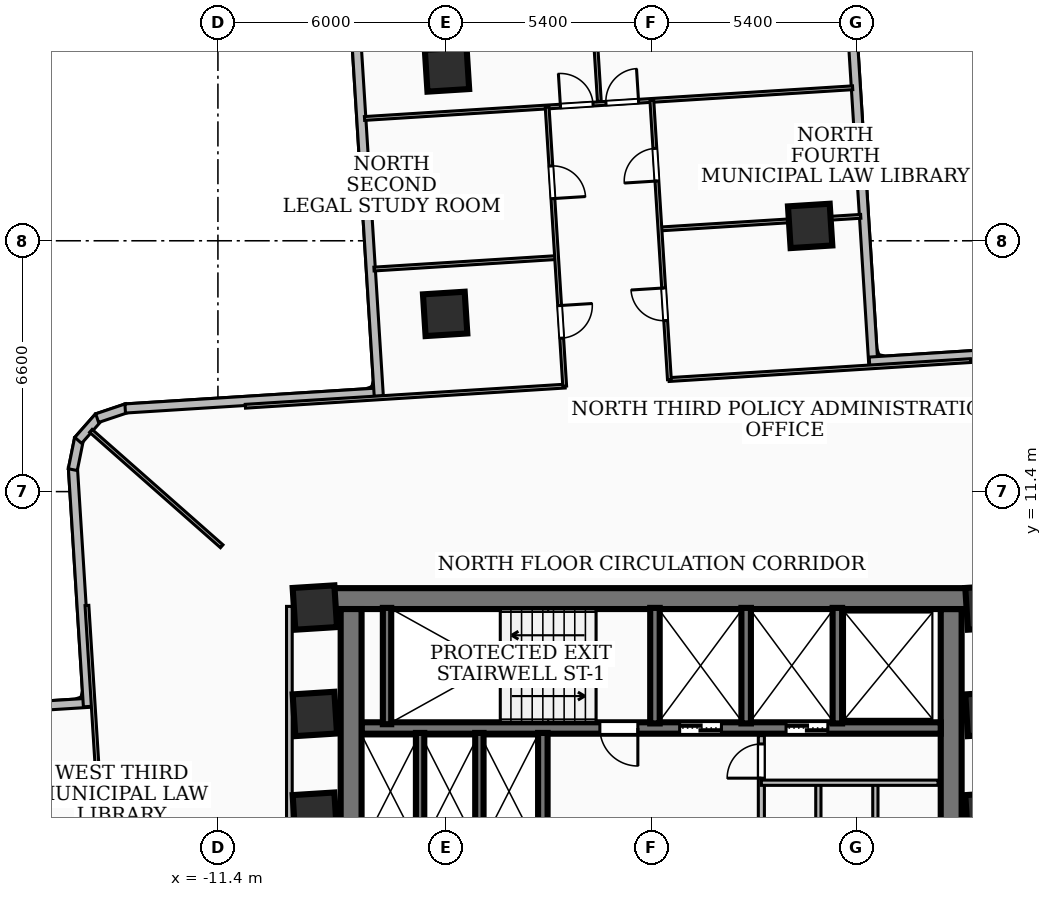
"""IFC4 building model, lengths in metres.
Left out: names, types, materials, properties, quantities, classifications, styles, units other than length and angle.
Written with IfcOpenShell. Run it as: python <this file> out.ifc"""

import sys

from ifc_helpers import new_model, si_unit, direction, frame, frame_2d, origin, origin_2d, place, context, subcontext, project, spatial, rectangle, extrude, element, fill, save


model = new_model("IFC4")
c1 = context("Model", 3, precision=1e-05, world=origin(), true_north=direction((0.0, 1.0)))
c2 = subcontext(c1, "Body", "Model", "MODEL_VIEW")
j1 = project(units=[si_unit("LENGTHUNIT", "METRE"), si_unit("PLANEANGLEUNIT", "RADIAN")], contexts=[c1])
p1 = place(None, origin())
s1 = spatial("IfcSite", under=j1, at=p1, CompositionType="ELEMENT")
p2 = place(p1, origin())
s2 = spatial("IfcBuilding", under=s1, at=p2, CompositionType="ELEMENT")
p3 = place(p2, frame((0.0, 0.0, 49.68)))
s3 = spatial("IfcBuildingStorey", under=s2, at=p3, CompositionType="ELEMENT", Elevation=49.68)
p4 = place(p3, frame((-8.78, 8.585, 0.0), z_axis=(0.0, 0.0, 1.0), x_axis=(1.0, 0.0, 0.0)))
e1 = element("IfcWall", 1, at=p4, inside=s3, PredefinedType="SHEAR", context=c2, shape_type="SweptSolid", body=[
    extrude(rectangle(XDim=17.56, YDim=0.55, at=frame_2d((8.78, 0.0))), origin(), (0.0, 0.0, 1.0), 3.32),
])
for number, where, z_axis, x_axis in (
    (2, (-7.895, 2.025, 0.0), (0.0, 0.0, 1.0), (0.0, 1.0, 0.0)),
    (3, (7.895, 8.31, 0.0), (0.0, 0.0, 1.0), (0.0, -1.0, 0.0)),
):
    element("IfcWall", number, at=place(p3, frame(where, z_axis=z_axis, x_axis=x_axis)), inside=s3, PredefinedType="SHEAR", context=c2, shape_type="SweptSolid", body=[
        extrude(rectangle(XDim=6.285, YDim=0.55, at=frame_2d((3.143, 0.0))), origin(), (0.0, 0.0, 1.0), 3.32),
    ])
p5 = place(p3, frame((7.62, 5.18, 0.0), z_axis=(0.0, 0.0, 1.0), x_axis=(-1.0, 0.0, 0.0)))
e4 = element("IfcWall", 4, at=p5, inside=s3, PredefinedType="SOLIDWALL", context=c2, shape_type="SweptSolid", body=[
    extrude(rectangle(XDim=15.24, YDim=0.3, at=frame_2d((7.62, 0.0))), origin(), (0.0, 0.0, 1.0), 3.32),
])
p6 = place(p5, frame((5.77, 0.0, 0.0)))
e5 = element("IfcOpeningElement", 5, at=p6, cuts=e4, PredefinedType="OPENING", context=c2, shape_type="SweptSolid", body=[
    extrude(rectangle(XDim=1.1, YDim=2.15, at=frame_2d((0.55, 1.075))), frame((0.0, 0.16, 0.0), z_axis=(0.0, -1.0, 0.0), x_axis=(1.0, 0.0, 0.0)), (0.0, 0.0, 1.0), 0.32),
])
p7 = place(p5, frame((2.97, 0.0, 0.0)))
e6 = element("IfcOpeningElement", 6, at=p7, cuts=e4, PredefinedType="OPENING", context=c2, shape_type="SweptSolid", body=[
    extrude(rectangle(XDim=1.1, YDim=2.15, at=frame_2d((0.55, 1.075))), frame((0.0, 0.16, 0.0), z_axis=(0.0, -1.0, 0.0), x_axis=(1.0, 0.0, 0.0)), (0.0, 0.0, 1.0), 0.32),
])
p8 = place(p5, frame((7.97, 0.0, 0.0)))
e7 = element("IfcOpeningElement", 7, at=p8, cuts=e4, PredefinedType="OPENING", context=c2, shape_type="SweptSolid", body=[
    extrude(rectangle(XDim=1.0, YDim=2.1, at=frame_2d((0.5, 1.05))), frame((0.0, 0.16, 0.0), z_axis=(0.0, -1.0, 0.0), x_axis=(1.0, 0.0, 0.0)), (0.0, 0.0, 1.0), 0.32),
])
p9 = place(p3, frame((-6.95, 5.28, 0.0), z_axis=(0.0, 0.0, 1.0), x_axis=(0.0, 1.0, 0.0)))
e8 = element("IfcWall", 8, at=p9, inside=s3, PredefinedType="SOLIDWALL", context=c2, shape_type="SweptSolid", body=[
    extrude(rectangle(XDim=3.06, YDim=0.22, at=frame_2d((1.53, 0.0))), origin(), (0.0, 0.0, 1.0), 3.32),
])
for number, where, z_axis, x_axis in (
    (9, (0.1, 5.3, 0.0), (0.0, 0.0, 1.0), (0.0, 1.0, 0.0)),
    (10, (2.5, 5.3, 0.0), (0.0, 0.0, 1.0), (0.0, 1.0, 0.0)),
    (11, (4.9, 5.3, 0.0), (0.0, 0.0, 1.0), (0.0, 1.0, 0.0)),
):
    element("IfcWall", number, at=place(p3, frame(where, z_axis=z_axis, x_axis=x_axis)), inside=s3, PredefinedType="SOLIDWALL", context=c2, shape_type="SweptSolid", body=[
        extrude(rectangle(XDim=3.04, YDim=0.25, at=frame_2d((1.52, 0.0))), origin(), (0.0, 0.0, 1.0), 3.32),
    ])
p10 = place(p3, frame((-2.85, 1.98, 0.0), z_axis=(0.0, 0.0, 1.0), x_axis=(0.0, 1.0, 0.0)))
e12 = element("IfcWall", 12, at=p10, inside=s3, PredefinedType="SOLIDWALL", context=c2, shape_type="SweptSolid", body=[
    extrude(rectangle(XDim=3.07, YDim=0.25, at=frame_2d((1.535, 0.0))), origin(), (0.0, 0.0, 1.0), 3.32),
])
for number, where, z_axis, x_axis in (
    (13, (-6.08, 1.98, 0.0), (0.0, 0.0, 1.0), (0.0, 1.0, 0.0)),
    (14, (-4.52, 1.98, 0.0), (0.0, 0.0, 1.0), (0.0, 1.0, 0.0)),
):
    element("IfcWall", number, at=place(p3, frame(where, z_axis=z_axis, x_axis=x_axis)), inside=s3, PredefinedType="SOLIDWALL", context=c2, shape_type="SweptSolid", body=[
        extrude(rectangle(XDim=3.07, YDim=0.22, at=frame_2d((1.535, 0.0))), origin(), (0.0, 0.0, 1.0), 3.32),
    ])
for number, where, z_axis, x_axis in (
    (15, (-8.85, 2.9, 0.0), (0.0, 0.0, 1.0), (0.998, 0.063, 0.0)),
    (16, (-8.85, 5.55, 0.0), (0.0, 0.0, 1.0), (0.998, 0.063, 0.0)),
    (17, (8.85, 2.9, 0.0), (0.0, 0.0, 1.0), (0.998, 0.063, 0.0)),
    (18, (8.85, 5.55, 0.0), (0.0, 0.0, 1.0), (0.998, 0.063, 0.0)),
    (19, (-8.85, 8.35, 0.0), (0.0, 0.0, 1.0), (0.998, 0.063, 0.0)),
    (20, (8.85, 8.35, 0.0), (0.0, 0.0, 1.0), (0.998, 0.063, 0.0)),
    (21, (4.184, 18.391, 0.0), (0.0, 0.0, 1.0), (0.998, 0.063, 0.0)),
    (22, (-5.421, 16.076, 0.0), (0.0, 0.0, 1.0), (0.998, 0.063, 0.0)),
    (23, (-5.372, 22.507, 0.0), (0.0, 0.0, 1.0), (0.998, 0.063, 0.0)),
):
    element("IfcColumn", number, at=place(p3, frame(where, z_axis=z_axis, x_axis=x_axis)), inside=s3, PredefinedType="COLUMN", context=c2, shape_type="SweptSolid", body=[
        extrude(rectangle(XDim=1.1, YDim=1.1, at=origin_2d()), origin(), (0.0, 0.0, 1.0), 3.6),
    ])
p11 = place(p3, frame((-31.572, 4.787, 0.0), z_axis=(0.0, 0.0, 1.0), x_axis=(0.998025974342, 0.062802504235, 0.0)))
e24 = element("IfcWall", 24, at=p11, inside=s3, PredefinedType="SOLIDWALL", context=c2, shape_type="SweptSolid", body=[
    extrude(rectangle(XDim=16.875, YDim=0.24, at=frame_2d((8.438, 0.0))), origin(), (0.0, 0.0, 1.0), 3.32),
])
p12 = place(p11, frame((1.1, 0.0, 0.85)))
e25 = element("IfcOpeningElement", 25, at=p12, cuts=e24, PredefinedType="OPENING", context=c2, shape_type="SweptSolid", body=[
    extrude(rectangle(XDim=1.8, YDim=1.8, at=frame_2d((0.9, 0.9))), frame((0.0, 0.13, 0.0), z_axis=(0.0, -1.0, 0.0), x_axis=(1.0, 0.0, 0.0)), (0.0, 0.0, 1.0), 0.26),
])
p13 = place(p3, frame((-14.82, 5.745, 0.0), z_axis=(0.0, 0.0, 1.0), x_axis=(-0.062902193405, 0.998019696231, 0.0)))
e26 = element("IfcWall", 26, at=p13, inside=s3, PredefinedType="SOLIDWALL", context=c2, shape_type="SweptSolid", body=[
    extrude(rectangle(XDim=6.295, YDim=0.24, at=frame_2d((3.148, 0.0))), origin(), (0.0, 0.0, 1.0), 3.32),
])
p14 = place(p3, frame((-15.219, 11.978, 0.0), z_axis=(0.0, 0.0, 1.0), x_axis=(0.198715846348, 0.980057147523, 0.0)))
e27 = element("IfcWall", 27, at=p14, inside=s3, PredefinedType="SOLIDWALL", context=c2, shape_type="SweptSolid", body=[
    extrude(rectangle(XDim=0.831, YDim=0.24, at=frame_2d((0.415, 0.0))), origin(), (0.0, 0.0, 1.0), 3.32),
])
p15 = place(p3, frame((-15.076, 12.748, 0.0), z_axis=(0.0, 0.0, 1.0), x_axis=(0.66076961759, 0.750588777208, 0.0)))
e28 = element("IfcWall", 28, at=p15, inside=s3, PredefinedType="SOLIDWALL", context=c2, shape_type="SweptSolid", body=[
    extrude(rectangle(XDim=0.815, YDim=0.24, at=frame_2d((0.408, 0.0))), origin(), (0.0, 0.0, 1.0), 3.32),
])
p16 = place(p3, frame((-14.578, 13.333, 0.0), z_axis=(0.0, 0.0, 1.0), x_axis=(0.948093326492, 0.317992207862, 0.0)))
e29 = element("IfcWall", 29, at=p16, inside=s3, PredefinedType="SOLIDWALL", context=c2, shape_type="SweptSolid", body=[
    extrude(rectangle(XDim=0.83, YDim=0.24, at=frame_2d((0.415, 0.0))), origin(), (0.0, 0.0, 1.0), 3.32),
])
p17 = place(p3, frame((-13.84, 13.587, 0.0), z_axis=(0.0, 0.0, 1.0), x_axis=(0.998021898782, 0.062867237505, 0.0)))
e30 = element("IfcWall", 30, at=p17, inside=s3, PredefinedType="SOLIDWALL", context=c2, shape_type="SweptSolid", body=[
    extrude(rectangle(XDim=6.777, YDim=0.24, at=frame_2d((3.388, 0.0))), origin(), (0.0, 0.0, 1.0), 3.32),
])
p18 = place(p3, frame((-7.167, 13.911, 0.0), z_axis=(0.0, 0.0, 1.0), x_axis=(-0.062847485521, 0.9980231428, 0.0)))
e31 = element("IfcWall", 31, at=p18, inside=s3, PredefinedType="SOLIDWALL", context=c2, shape_type="SweptSolid", body=[
    extrude(rectangle(XDim=13.476, YDim=0.24, at=frame_2d((6.738, 0.0))), origin(), (0.0, 0.0, 1.0), 3.32),
])
p19 = place(p18, frame((10.576, 0.0, 0.85)))
e32 = element("IfcOpeningElement", 32, at=p19, cuts=e31, PredefinedType="OPENING", context=c2, shape_type="SweptSolid", body=[
    extrude(rectangle(XDim=1.8, YDim=2.0, at=frame_2d((0.9, 1.0))), frame((0.0, 0.13, 0.0), z_axis=(0.0, -1.0, 0.0), x_axis=(1.0, 0.0, 0.0)), (0.0, 0.0, 1.0), 0.26),
])
p20 = place(p3, frame((5.0, 28.179, 0.0), z_axis=(0.0, 0.0, 1.0), x_axis=(0.062848621891, -0.99802307124, 0.0)))
e33 = element("IfcWall", 33, at=p20, inside=s3, PredefinedType="SOLIDWALL", context=c2, shape_type="SweptSolid", body=[
    extrude(rectangle(XDim=13.476, YDim=0.24, at=frame_2d((6.738, 0.0))), origin(), (0.0, 0.0, 1.0), 2.401),
])
p21 = place(p3, frame((5.745, 14.82, 0.0), z_axis=(0.0, 0.0, 1.0), x_axis=(0.998019696231, 0.062902193405, 0.0)))
e34 = element("IfcWall", 34, at=p21, inside=s3, PredefinedType="SOLIDWALL", context=c2, shape_type="SweptSolid", body=[
    extrude(rectangle(XDim=6.295, YDim=0.24, at=frame_2d((3.148, 0.0))), origin(), (0.0, 0.0, 1.0), 2.401),
])
p22 = place(p3, frame((2.9, 2.04, 0.0), z_axis=(0.0, 0.0, 1.0), x_axis=(0.0, 1.0, 0.0)))
e35 = element("IfcWall", 35, at=p22, inside=s3, PredefinedType="PARTITIONING", context=c2, shape_type="SweptSolid", body=[
    extrude(rectangle(XDim=2.94, YDim=0.16, at=frame_2d((1.47, 0.0))), origin(), (0.0, 0.0, 1.0), 2.385),
])
p23 = place(p22, frame((1.82, 0.0, 0.0)))
e36 = element("IfcOpeningElement", 36, at=p23, cuts=e35, PredefinedType="OPENING", context=c2, shape_type="SweptSolid", body=[
    extrude(rectangle(XDim=0.9, YDim=2.06, at=frame_2d((0.45, 1.03))), frame((0.0, 0.09, 0.0), z_axis=(0.0, -1.0, 0.0), x_axis=(1.0, 0.0, 0.0)), (0.0, 0.0, 1.0), 0.18),
])
p24 = place(p3, frame((2.9, 3.74, 0.0), z_axis=(0.0, 0.0, 1.0), x_axis=(1.0, 0.0, 0.0)))
e37 = element("IfcWall", 37, at=p24, inside=s3, PredefinedType="PARTITIONING", context=c2, shape_type="SweptSolid", body=[
    extrude(rectangle(XDim=4.65, YDim=0.138, at=frame_2d((2.325, 0.0))), origin(), (0.0, 0.0, 1.0), 3.32),
])
for number, where, z_axis, x_axis in (
    (38, (4.4, 1.85, 0.0), (0.0, 0.0, 1.0), (0.0, 1.0, 0.0)),
    (39, (5.9, 1.85, 0.0), (0.0, 0.0, 1.0), (0.0, 1.0, 0.0)),
):
    element("IfcWall", number, at=place(p3, frame(where, z_axis=z_axis, x_axis=x_axis)), inside=s3, PredefinedType="PARTITIONING", context=c2, shape_type="SweptSolid", body=[
        extrude(rectangle(XDim=1.89, YDim=0.138, at=frame_2d((0.945, 0.0))), origin(), (0.0, 0.0, 1.0), 2.385),
    ])
p25 = place(p3, frame((-9.52, 1.75, 0.0), z_axis=(0.0, 0.0, 1.0), x_axis=(0.0, 1.0, 0.0)))
e40 = element("IfcWall", 40, at=p25, inside=s3, PredefinedType="PARTITIONING", context=c2, shape_type="SweptSolid", body=[
    extrude(rectangle(XDim=6.63, YDim=0.15, at=frame_2d((3.315, 0.0))), origin(), (0.0, 0.0, 1.0), 2.401),
])
p26 = place(p3, frame((-11.3, 9.962, 0.0), z_axis=(0.0, 0.0, 1.0), x_axis=(-0.750020974917, 0.661414043686, 0.0)))
e41 = element("IfcWall", 41, at=p26, inside=s3, PredefinedType="PARTITIONING", context=c2, shape_type="SweptSolid", body=[
    extrude(rectangle(XDim=4.59, YDim=0.1, at=frame_2d((2.295, 0.0))), origin(), (0.0, 0.0, 1.0), 3.32),
])
p27 = place(p3, frame((-2.265, 14.176, 0.0), z_axis=(0.0, 0.0, 1.0), x_axis=(-0.998021351542, -0.062875924382, 0.0)))
e42 = element("IfcWall", 42, at=p27, inside=s3, PredefinedType="PARTITIONING", context=c2, shape_type="SweptSolid", body=[
    extrude(rectangle(XDim=8.43, YDim=0.1, at=frame_2d((4.215, 0.0))), origin(), (0.0, 0.0, 1.0), 2.401),
])
p28 = place(p3, frame((8.404, 14.847, 0.0), z_axis=(0.0, 0.0, 1.0), x_axis=(-0.998027884619, -0.062772139706, 0.0)))
e43 = element("IfcWall", 43, at=p28, inside=s3, PredefinedType="PARTITIONING", context=c2, shape_type="SweptSolid", body=[
    extrude(rectangle(XDim=7.95, YDim=0.1, at=frame_2d((3.975, 0.0))), origin(), (0.0, 0.0, 1.0), 2.401),
])
p29 = place(p3, frame((-2.507, 17.557, 0.0), z_axis=(0.0, 0.0, 1.0), x_axis=(-0.998030925593, -0.062723771889, 0.0)))
e44 = element("IfcWall", 44, at=p29, inside=s3, PredefinedType="PARTITIONING", context=c2, shape_type="SweptSolid", body=[
    extrude(rectangle(XDim=4.795, YDim=0.1, at=frame_2d((2.398, 0.0))), origin(), (0.0, 0.0, 1.0), 2.401),
])
p30 = place(p3, frame((5.515, 18.643, 0.0), z_axis=(0.0, 0.0, 1.0), x_axis=(-0.998028187643, -0.062767321666, 0.0)))
e45 = element("IfcWall", 45, at=p30, inside=s3, PredefinedType="PARTITIONING", context=c2, shape_type="SweptSolid", body=[
    extrude(rectangle(XDim=5.274, YDim=0.1, at=frame_2d((2.637, 0.0))), origin(), (0.0, 0.0, 1.0), 2.401),
])
p31 = place(p3, frame((-2.737, 21.521, 0.0), z_axis=(0.0, 0.0, 1.0), x_axis=(0.062789217057, -0.998026810372, 0.0)))
e46 = element("IfcWall", 46, at=p31, inside=s3, PredefinedType="PARTITIONING", context=c2, shape_type="SweptSolid", body=[
    extrude(rectangle(XDim=7.36, YDim=0.1, at=frame_2d((3.68, 0.0))), origin(), (0.0, 0.0, 1.0), 3.32),
])
p32 = place(p31, frame((5.236, 0.0, 0.0)))
e47 = element("IfcOpeningElement", 47, at=p32, cuts=e46, PredefinedType="OPENING", context=c2, shape_type="SweptSolid", body=[
    extrude(rectangle(XDim=0.86, YDim=2.04, at=frame_2d((0.43, 1.02))), frame((0.0, 0.06, 0.0), z_axis=(0.0, -1.0, 0.0), x_axis=(1.0, 0.0, 0.0)), (0.0, 0.0, 1.0), 0.12),
])
p33 = place(p31, frame((1.556, 0.0, 0.0)))
e48 = element("IfcOpeningElement", 48, at=p33, cuts=e46, PredefinedType="OPENING", context=c2, shape_type="SweptSolid", body=[
    extrude(rectangle(XDim=0.86, YDim=2.04, at=frame_2d((0.43, 1.02))), frame((0.0, 0.06, 0.0), z_axis=(0.0, -1.0, 0.0), x_axis=(1.0, 0.0, 0.0)), (0.0, 0.0, 1.0), 0.12),
])
p34 = place(p3, frame((0.48, 14.348, 0.0), z_axis=(0.0, 0.0, 1.0), x_axis=(-0.062754101162, 0.998029019011, 0.0)))
e49 = element("IfcWall", 49, at=p34, inside=s3, PredefinedType="PARTITIONING", context=c2, shape_type="SweptSolid", body=[
    extrude(rectangle(XDim=7.361, YDim=0.1, at=frame_2d((3.68, 0.0))), origin(), (0.0, 0.0, 1.0), 3.32),
])
p35 = place(p34, frame((1.555, 0.0, 0.0)))
e50 = element("IfcOpeningElement", 50, at=p35, cuts=e49, PredefinedType="OPENING", context=c2, shape_type="SweptSolid", body=[
    extrude(rectangle(XDim=0.86, YDim=2.04, at=frame_2d((0.43, 1.02))), frame((0.0, 0.06, 0.0), z_axis=(0.0, -1.0, 0.0), x_axis=(1.0, 0.0, 0.0)), (0.0, 0.0, 1.0), 0.12),
])
p36 = place(p34, frame((5.235, 0.0, 0.0)))
e51 = element("IfcOpeningElement", 51, at=p36, cuts=e49, PredefinedType="OPENING", context=c2, shape_type="SweptSolid", body=[
    extrude(rectangle(XDim=0.86, YDim=2.04, at=frame_2d((0.43, 1.02))), frame((0.0, 0.06, 0.0), z_axis=(0.0, -1.0, 0.0), x_axis=(1.0, 0.0, 0.0)), (0.0, 0.0, 1.0), 0.12),
])
p37 = place(p3, frame((-1.363, 21.667, 0.0), z_axis=(0.0, 0.0, 1.0), x_axis=(-0.062790517126, 0.998026728579, 0.0)))
e52 = element("IfcWall", 52, at=p37, inside=s3, PredefinedType="PARTITIONING", context=c2, shape_type="SweptSolid", body=[
    extrude(rectangle(XDim=7.485, YDim=0.1, at=frame_2d((3.742, 0.0))), origin(), (0.0, 0.0, 1.0), 2.812),
])
p38 = place(p3, frame((-7.542, 21.218, 0.0), z_axis=(0.0, 0.0, 1.0), x_axis=(0.998027771759, 0.062773934056, 0.0)))
e53 = element("IfcWall", 53, at=p38, inside=s3, PredefinedType="PARTITIONING", context=c2, shape_type="SweptSolid", body=[
    extrude(rectangle(XDim=12.869, YDim=0.1, at=frame_2d((6.435, 0.0))), origin(), (0.0, 0.0, 1.0), 2.401),
])
p39 = place(p38, frame((6.365, 0.0, 0.0)))
e54 = element("IfcOpeningElement", 54, at=p39, cuts=e53, PredefinedType="OPENING", context=c2, shape_type="SweptSolid", body=[
    extrude(rectangle(XDim=0.86, YDim=2.04, at=frame_2d((0.43, 1.02))), frame((0.0, 0.06, 0.0), z_axis=(0.0, -1.0, 0.0), x_axis=(1.0, 0.0, 0.0)), (0.0, 0.0, 1.0), 0.12),
])
p40 = place(p38, frame((5.165, 0.0, 0.0)))
e55 = element("IfcOpeningElement", 55, at=p40, cuts=e53, PredefinedType="OPENING", context=c2, shape_type="SweptSolid", body=[
    extrude(rectangle(XDim=0.86, YDim=2.04, at=frame_2d((0.43, 1.02))), frame((0.0, 0.06, 0.0), z_axis=(0.0, -1.0, 0.0), x_axis=(1.0, 0.0, 0.0)), (0.0, 0.0, 1.0), 0.12),
])
p41 = place(p3, frame((-14.847, 8.404, 0.0), z_axis=(0.0, 0.0, 1.0), x_axis=(0.062772139706, -0.998027884619, 0.0)))
e56 = element("IfcWall", 56, at=p41, inside=s3, PredefinedType="PARTITIONING", context=c2, shape_type="SweptSolid", body=[
    extrude(rectangle(XDim=7.95, YDim=0.1, at=frame_2d((3.975, 0.0))), origin(), (0.0, 0.0, 1.0), 2.401),
])
p42 = place(p6, origin())
e57 = element("IfcDoor", 57, at=p42, inside=s3, OperationType="DOUBLE_DOOR_SLIDING", PredefinedType="DOOR", context=c2, shape_type="SweptSolid", body=[
    extrude(rectangle(XDim=1.1, YDim=2.15, at=frame_2d((0.55, 1.075))), frame((0.0, 0.025, 0.0), z_axis=(0.0, -1.0, 0.0), x_axis=(1.0, 0.0, 0.0)), (0.0, 0.0, 1.0), 0.05),
])
fill(e5, e57)
p43 = place(p7, origin())
e58 = element("IfcDoor", 58, at=p43, inside=s3, OperationType="DOUBLE_DOOR_SLIDING", PredefinedType="DOOR", context=c2, shape_type="SweptSolid", body=[
    extrude(rectangle(XDim=1.1, YDim=2.15, at=frame_2d((0.55, 1.075))), frame((0.0, 0.025, 0.0), z_axis=(0.0, -1.0, 0.0), x_axis=(1.0, 0.0, 0.0)), (0.0, 0.0, 1.0), 0.05),
])
fill(e6, e58)
p44 = place(p8, origin())
e59 = element("IfcDoor", 59, at=p44, inside=s3, OperationType="SINGLE_SWING_LEFT", PredefinedType="DOOR", context=c2, shape_type="SweptSolid", body=[
    extrude(rectangle(XDim=1.0, YDim=2.1, at=frame_2d((0.5, 1.05))), frame((0.0, 0.025, 0.0), z_axis=(0.0, -1.0, 0.0), x_axis=(1.0, 0.0, 0.0)), (0.0, 0.0, 1.0), 0.05),
])
fill(e7, e59)
p45 = place(p23, origin())
e60 = element("IfcDoor", 60, at=p45, inside=s3, OperationType="SINGLE_SWING_LEFT", PredefinedType="DOOR", context=c2, shape_type="SweptSolid", body=[
    extrude(rectangle(XDim=0.9, YDim=2.06, at=frame_2d((0.45, 1.03))), frame((0.0, 0.025, 0.0), z_axis=(0.0, -1.0, 0.0), x_axis=(1.0, 0.0, 0.0)), (0.0, 0.0, 1.0), 0.05),
])
fill(e36, e60)
p46 = place(p32, origin())
e61 = element("IfcDoor", 61, at=p46, inside=s3, OperationType="SINGLE_SWING_LEFT", PredefinedType="DOOR", context=c2, shape_type="SweptSolid", body=[
    extrude(rectangle(XDim=0.86, YDim=2.04, at=frame_2d((0.43, 1.02))), frame((0.0, 0.025, 0.0), z_axis=(0.0, -1.0, 0.0), x_axis=(1.0, 0.0, 0.0)), (0.0, 0.0, 1.0), 0.05),
])
fill(e47, e61)
p47 = place(p33, origin())
e62 = element("IfcDoor", 62, at=p47, inside=s3, OperationType="SINGLE_SWING_RIGHT", PredefinedType="DOOR", context=c2, shape_type="SweptSolid", body=[
    extrude(rectangle(XDim=0.86, YDim=2.04, at=frame_2d((0.43, 1.02))), frame((0.0, 0.025, 0.0), z_axis=(0.0, -1.0, 0.0), x_axis=(1.0, 0.0, 0.0)), (0.0, 0.0, 1.0), 0.05),
])
fill(e48, e62)
p48 = place(p35, origin())
e63 = element("IfcDoor", 63, at=p48, inside=s3, OperationType="SINGLE_SWING_RIGHT", PredefinedType="DOOR", context=c2, shape_type="SweptSolid", body=[
    extrude(rectangle(XDim=0.86, YDim=2.04, at=frame_2d((0.43, 1.02))), frame((0.0, 0.025, 0.0), z_axis=(0.0, -1.0, 0.0), x_axis=(1.0, 0.0, 0.0)), (0.0, 0.0, 1.0), 0.05),
])
fill(e50, e63)
p49 = place(p36, origin())
e64 = element("IfcDoor", 64, at=p49, inside=s3, OperationType="SINGLE_SWING_LEFT", PredefinedType="DOOR", context=c2, shape_type="SweptSolid", body=[
    extrude(rectangle(XDim=0.86, YDim=2.04, at=frame_2d((0.43, 1.02))), frame((0.0, 0.025, 0.0), z_axis=(0.0, -1.0, 0.0), x_axis=(1.0, 0.0, 0.0)), (0.0, 0.0, 1.0), 0.05),
])
fill(e51, e64)
p50 = place(p39, origin())
e65 = element("IfcDoor", 65, at=p50, inside=s3, OperationType="SINGLE_SWING_RIGHT", PredefinedType="DOOR", context=c2, shape_type="SweptSolid", body=[
    extrude(rectangle(XDim=0.86, YDim=2.04, at=frame_2d((0.43, 1.02))), frame((0.0, 0.025, 0.0), z_axis=(0.0, -1.0, 0.0), x_axis=(1.0, 0.0, 0.0)), (0.0, 0.0, 1.0), 0.05),
])
fill(e54, e65)
p51 = place(p40, origin())
e66 = element("IfcDoor", 66, at=p51, inside=s3, OperationType="SINGLE_SWING_LEFT", PredefinedType="DOOR", context=c2, shape_type="SweptSolid", body=[
    extrude(rectangle(XDim=0.86, YDim=2.04, at=frame_2d((0.43, 1.02))), frame((0.0, 0.025, 0.0), z_axis=(0.0, -1.0, 0.0), x_axis=(1.0, 0.0, 0.0)), (0.0, 0.0, 1.0), 0.05),
])
fill(e55, e66)
save(model, sys.argv[1])
